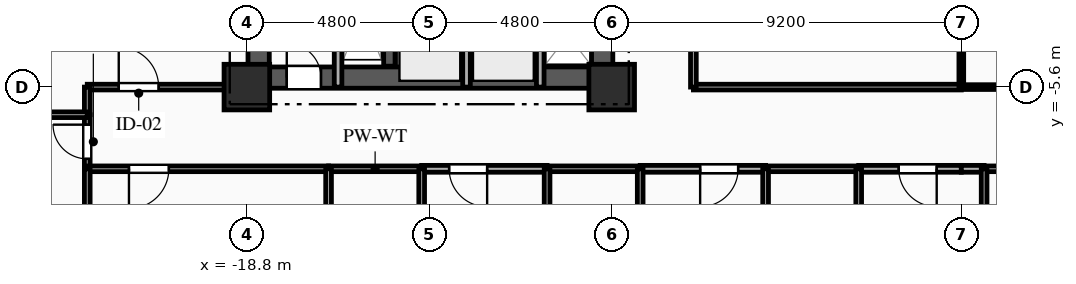
"""IFC4 building model, lengths in metres.
Left out: names, types, materials, properties, quantities, classifications, styles, units other than length and angle.
Written with IfcOpenShell. Run it as: python <this file> out.ifc"""

import sys

from ifc_helpers import new_model, si_unit, direction, frame, frame_2d, origin, origin_2d, place, context, subcontext, project, spatial, rectangle, extrude, element, fill, save


model = new_model("IFC4")
c1 = context("Model", 3, precision=1e-05, world=origin(), true_north=direction((0.0, 1.0)))
c2 = subcontext(c1, "Body", "Model", "MODEL_VIEW")
j1 = project(units=[si_unit("LENGTHUNIT", "METRE"), si_unit("PLANEANGLEUNIT", "RADIAN")], contexts=[c1])
p1 = place(None, origin())
s1 = spatial("IfcSite", under=j1, at=p1, CompositionType="ELEMENT")
p2 = place(p1, origin())
s2 = spatial("IfcBuilding", under=s1, at=p2, CompositionType="ELEMENT")
p3 = place(p2, frame((0.0, 0.0, 70.55)))
s3 = spatial("IfcBuildingStorey", under=s2, at=p3, CompositionType="ELEMENT", Elevation=70.55)
for number, where, z_axis, x_axis in (
    (1, (-18.8, -5.6, 0.0), (0.0, 0.0, 1.0), (1.0, 0.0, 0.0)),
    (2, (-9.2, -5.6, 0.0), (0.0, 0.0, 1.0), (1.0, 0.0, 0.0)),
):
    element("IfcColumn", number, at=place(p3, frame(where, z_axis=z_axis, x_axis=x_axis)), inside=s3, PredefinedType="COLUMN", context=c2, shape_type="SweptSolid", body=[
        extrude(rectangle(XDim=1.2, YDim=1.2, at=origin_2d()), origin(), (0.0, 0.0, 1.0), 3.35),
    ])
p4 = place(p3, frame((-18.8, -5.35, 0.0), z_axis=(0.0, 0.0, 1.0), x_axis=(1.0, 0.0, 0.0)))
e3 = element("IfcWall", 3, at=p4, inside=s3, PredefinedType="SHEAR", context=c2, shape_type="SweptSolid", body=[
    extrude(rectangle(XDim=9.6, YDim=0.56, at=frame_2d((4.8, 0.0))), origin(), (0.0, 0.0, 1.0), 3.0),
])
p5 = place(p4, frame((1.05, 0.0, 0.0)))
e4 = element("IfcOpeningElement", 4, at=p5, cuts=e3, PredefinedType="OPENING", context=c2, shape_type="SweptSolid", body=[
    extrude(rectangle(XDim=0.9, YDim=2.1, at=frame_2d((0.45, 1.05))), frame((0.0, 0.29, 0.0), z_axis=(0.0, -1.0, 0.0), x_axis=(1.0, 0.0, 0.0)), (0.0, 0.0, 1.0), 0.58),
])
p6 = place(p3, frame((-18.49, -5.05, 0.0), z_axis=(0.0, 0.0, 1.0), x_axis=(0.0, 1.0, 0.0)))
e5 = element("IfcWall", 5, at=p6, inside=s3, PredefinedType="SHEAR", context=c2, shape_type="SweptSolid", body=[
    extrude(rectangle(XDim=10.1, YDim=0.56, at=frame_2d((5.05, 0.0))), origin(), (0.0, 0.0, 1.0), 3.0),
])
p7 = place(p3, frame((-9.45, -5.05, 0.0), z_axis=(0.0, 0.0, 1.0), x_axis=(0.0, 1.0, 0.0)))
e6 = element("IfcWall", 6, at=p7, inside=s3, PredefinedType="SHEAR", context=c2, shape_type="SweptSolid", body=[
    extrude(rectangle(XDim=10.1, YDim=0.56, at=frame_2d((5.05, 0.0))), origin(), (0.0, 0.0, 1.0), 3.0),
])
p8 = place(p7, frame((7.15, 0.0, 0.0)))
e7 = element("IfcOpeningElement", 7, at=p8, cuts=e6, PredefinedType="OPENING", context=c2, shape_type="SweptSolid", body=[
    extrude(rectangle(XDim=0.9, YDim=2.1, at=frame_2d((0.45, 1.05))), frame((0.0, 0.29, 0.0), z_axis=(0.0, -1.0, 0.0), x_axis=(1.0, 0.0, 0.0)), (0.0, 0.0, 1.0), 0.58),
])
p9 = place(p7, frame((2.4, 0.0, 0.0)))
e8 = element("IfcOpeningElement", 8, at=p9, cuts=e6, PredefinedType="OPENING", context=c2, shape_type="SweptSolid", body=[
    extrude(rectangle(XDim=1.2, YDim=2.15, at=frame_2d((0.6, 1.075))), frame((0.0, 0.29, 0.0), z_axis=(0.0, -1.0, 0.0), x_axis=(1.0, 0.0, 0.0)), (0.0, 0.0, 1.0), 0.58),
])
p10 = place(p3, frame((-15.05, -5.05, 0.0), z_axis=(0.0, 0.0, 1.0), x_axis=(0.0, 1.0, 0.0)))
e9 = element("IfcWall", 9, at=p10, inside=s3, PredefinedType="SHEAR", context=c2, shape_type="SweptSolid", body=[
    extrude(rectangle(XDim=10.1, YDim=0.3, at=frame_2d((5.05, 0.0))), origin(), (0.0, 0.0, 1.0), 3.0),
])
p11 = place(p3, frame((-16.4, -5.6, 0.0), z_axis=(0.0, 0.0, 1.0), x_axis=(0.0, 1.0, 0.0)))
e10 = element("IfcWall", 10, at=p11, inside=s3, PredefinedType="PARTITIONING", context=c2, shape_type="SweptSolid", body=[
    extrude(rectangle(XDim=3.49, YDim=0.2, at=frame_2d((1.745, 0.0))), origin(), (0.0, 0.0, 1.0), 3.0),
])
for number, where, z_axis, x_axis in (
    (11, (-13.02, -5.6, 0.0), (0.0, 0.0, 1.0), (0.0, 1.0, 0.0)),
    (12, (-11.08, -5.6, 0.0), (0.0, 0.0, 1.0), (0.0, 1.0, 0.0)),
):
    element("IfcWall", number, at=place(p3, frame(where, z_axis=z_axis, x_axis=x_axis)), inside=s3, PredefinedType="PARTITIONING", context=c2, shape_type="SweptSolid", body=[
        extrude(rectangle(XDim=2.25, YDim=0.2, at=frame_2d((1.125, 0.0))), origin(), (0.0, 0.0, 1.0), 3.0),
    ])
p12 = place(p3, frame((-23.0, -7.75, 0.0), z_axis=(0.0, 0.0, 1.0), x_axis=(0.0, 1.0, 0.0)))
e13 = element("IfcWall", 13, at=p12, inside=s3, PredefinedType="PARTITIONING", context=c2, shape_type="SweptSolid", body=[
    extrude(rectangle(XDim=1.423, YDim=0.15, at=frame_2d((0.711, 0.0))), origin(), (0.0, 0.0, 1.0), 3.0),
])
p13 = place(p12, frame((0.261, 0.0, 0.0)))
e14 = element("IfcOpeningElement", 14, at=p13, cuts=e13, PredefinedType="OPENING", context=c2, shape_type="SweptSolid", body=[
    extrude(rectangle(XDim=0.9, YDim=2.1, at=frame_2d((0.45, 1.05))), frame((0.0, 0.085, 0.0), z_axis=(0.0, -1.0, 0.0), x_axis=(1.0, 0.0, 0.0)), (0.0, 0.0, 1.0), 0.17),
])
p14 = place(p3, frame((-23.0, -5.6, 0.0), z_axis=(0.0, 0.0, 1.0), x_axis=(1.0, 0.0, 0.0)))
e15 = element("IfcWall", 15, at=p14, inside=s3, PredefinedType="PARTITIONING", context=c2, shape_type="SweptSolid", body=[
    extrude(rectangle(XDim=4.2, YDim=0.15, at=frame_2d((2.1, 0.0))), origin(), (0.0, 0.0, 1.0), 3.0),
])
p15 = place(p14, frame((0.829, 0.0, 0.0)))
e16 = element("IfcOpeningElement", 16, at=p15, cuts=e15, PredefinedType="OPENING", context=c2, shape_type="SweptSolid", body=[
    extrude(rectangle(XDim=1.05, YDim=2.15, at=frame_2d((0.525, 1.075))), frame((0.0, 0.085, 0.0), z_axis=(0.0, -1.0, 0.0), x_axis=(1.0, 0.0, 0.0)), (0.0, 0.0, 1.0), 0.17),
])
p16 = place(p3, frame((-23.0, -6.327, 0.0), z_axis=(0.0, 0.0, 1.0), x_axis=(0.0, 1.0, 0.0)))
e17 = element("IfcWall", 17, at=p16, inside=s3, PredefinedType="PARTITIONING", context=c2, shape_type="SweptSolid", body=[
    extrude(rectangle(XDim=0.727, YDim=0.15, at=frame_2d((0.363, 0.0))), origin(), (0.0, 0.0, 1.0), 3.0),
])
p17 = place(p3, frame((-16.65, -7.75, 0.0), z_axis=(0.0, 0.0, 1.0), x_axis=(-1.0, 0.0, 0.0)))
e18 = element("IfcWall", 18, at=p17, inside=s3, PredefinedType="PARTITIONING", context=c2, shape_type="SweptSolid", body=[
    extrude(rectangle(XDim=6.35, YDim=0.15, at=frame_2d((3.175, 0.0))), origin(), (0.0, 0.0, 1.0), 3.0),
])
p18 = place(p17, frame((4.202, 0.0, 0.0)))
e19 = element("IfcOpeningElement", 19, at=p18, cuts=e18, PredefinedType="OPENING", context=c2, shape_type="SweptSolid", body=[
    extrude(rectangle(XDim=1.05, YDim=2.15, at=frame_2d((0.525, 1.075))), frame((0.0, 0.085, 0.0), z_axis=(0.0, -1.0, 0.0), x_axis=(1.0, 0.0, 0.0)), (0.0, 0.0, 1.0), 0.17),
])
p19 = place(p3, frame((-10.9, -7.75, 0.0), z_axis=(0.0, 0.0, 1.0), x_axis=(-1.0, 0.0, 0.0)))
e20 = element("IfcWall", 20, at=p19, inside=s3, PredefinedType="PARTITIONING", context=c2, shape_type="SweptSolid", body=[
    extrude(rectangle(XDim=3.3, YDim=0.18, at=frame_2d((1.65, 0.0))), origin(), (0.0, 0.0, 1.0), 3.0),
])
p20 = place(p19, frame((1.577, 0.0, 0.0)))
e21 = element("IfcOpeningElement", 21, at=p20, cuts=e20, PredefinedType="OPENING", context=c2, shape_type="SweptSolid", body=[
    extrude(rectangle(XDim=1.0, YDim=2.15, at=frame_2d((0.5, 1.075))), frame((0.0, 0.1, 0.0), z_axis=(0.0, -1.0, 0.0), x_axis=(1.0, 0.0, 0.0)), (0.0, 0.0, 1.0), 0.2),
])
p21 = place(p3, frame((-14.2, -7.75, 0.0), z_axis=(0.0, 0.0, 1.0), x_axis=(-1.0, 0.0, 0.0)))
e22 = element("IfcWall", 22, at=p21, inside=s3, PredefinedType="PLUMBINGWALL", context=c2, shape_type="SweptSolid", body=[
    extrude(rectangle(XDim=2.45, YDim=0.15, at=frame_2d((1.225, 0.0))), origin(), (0.0, 0.0, 1.0), 3.0),
])
p22 = place(p3, frame((-5.15, -7.75, 0.0), z_axis=(0.0, 0.0, 1.0), x_axis=(-1.0, 0.0, 0.0)))
e23 = element("IfcWall", 23, at=p22, inside=s3, PredefinedType="PARTITIONING", context=c2, shape_type="SweptSolid", body=[
    extrude(rectangle(XDim=3.3, YDim=0.18, at=frame_2d((1.65, 0.0))), origin(), (0.0, 0.0, 1.0), 3.0),
])
p23 = place(p22, frame((0.722, 0.0, 0.0)))
e24 = element("IfcOpeningElement", 24, at=p23, cuts=e23, PredefinedType="OPENING", context=c2, shape_type="SweptSolid", body=[
    extrude(rectangle(XDim=1.0, YDim=2.15, at=frame_2d((0.5, 1.075))), frame((0.0, 0.1, 0.0), z_axis=(0.0, -1.0, 0.0), x_axis=(1.0, 0.0, 0.0)), (0.0, 0.0, 1.0), 0.2),
])
p24 = place(p3, frame((-8.45, -7.75, 0.0), z_axis=(0.0, 0.0, 1.0), x_axis=(-1.0, 0.0, 0.0)))
e25 = element("IfcWall", 25, at=p24, inside=s3, PredefinedType="PLUMBINGWALL", context=c2, shape_type="SweptSolid", body=[
    extrude(rectangle(XDim=2.45, YDim=0.15, at=frame_2d((1.225, 0.0))), origin(), (0.0, 0.0, 1.0), 3.0),
])
p25 = place(p3, frame((0.0, -7.75, 0.0), z_axis=(0.0, 0.0, 1.0), x_axis=(-1.0, 0.0, 0.0)))
e26 = element("IfcWall", 26, at=p25, inside=s3, PredefinedType="PARTITIONING", context=c2, shape_type="SweptSolid", body=[
    extrude(rectangle(XDim=2.7, YDim=0.18, at=frame_2d((1.35, 0.0))), origin(), (0.0, 0.0, 1.0), 3.0),
])
p26 = place(p25, frame((0.647, 0.0, 0.0)))
e27 = element("IfcOpeningElement", 27, at=p26, cuts=e26, PredefinedType="OPENING", context=c2, shape_type="SweptSolid", body=[
    extrude(rectangle(XDim=1.0, YDim=2.15, at=frame_2d((0.5, 1.075))), frame((0.0, 0.1, 0.0), z_axis=(0.0, -1.0, 0.0), x_axis=(1.0, 0.0, 0.0)), (0.0, 0.0, 1.0), 0.2),
])
p27 = place(p3, frame((-2.7, -7.75, 0.0), z_axis=(0.0, 0.0, 1.0), x_axis=(-1.0, 0.0, 0.0)))
e28 = element("IfcWall", 28, at=p27, inside=s3, PredefinedType="PLUMBINGWALL", context=c2, shape_type="SweptSolid", body=[
    extrude(rectangle(XDim=2.45, YDim=0.15, at=frame_2d((1.225, 0.0))), origin(), (0.0, 0.0, 1.0), 3.0),
])
p28 = place(p3, frame((-7.05, -5.6, 0.0), z_axis=(0.0, 0.0, 1.0), x_axis=(1.0, 0.0, 0.0)))
e29 = element("IfcWall", 29, at=p28, inside=s3, PredefinedType="PARTITIONING", context=c2, shape_type="SweptSolid", body=[
    extrude(rectangle(XDim=7.05, YDim=0.15, at=frame_2d((3.525, 0.0))), origin(), (0.0, 0.0, 1.0), 2.485),
])
p29 = place(p3, frame((0.6, -7.75, 0.0), z_axis=(0.0, 0.0, 1.0), x_axis=(-1.0, 0.0, 0.0)))
e30 = element("IfcWall", 30, at=p29, inside=s3, PredefinedType="PARTITIONING", context=c2, shape_type="SweptSolid", body=[
    extrude(rectangle(XDim=0.6, YDim=0.18, at=frame_2d((0.3, 0.0))), origin(), (0.0, 0.0, 1.0), 3.0),
])
p30 = place(p3, frame((3.05, -7.75, 0.0), z_axis=(0.0, 0.0, 1.0), x_axis=(-1.0, 0.0, 0.0)))
e31 = element("IfcWall", 31, at=p30, inside=s3, PredefinedType="PLUMBINGWALL", context=c2, shape_type="SweptSolid", body=[
    extrude(rectangle(XDim=2.45, YDim=0.15, at=frame_2d((1.225, 0.0))), origin(), (0.0, 0.0, 1.0), 3.0),
])
p31 = place(p3, frame((0.0, -5.6, 0.0), z_axis=(0.0, 0.0, 1.0), x_axis=(1.0, 0.0, 0.0)))
e32 = element("IfcWall", 32, at=p31, inside=s3, PredefinedType="PARTITIONING", context=c2, shape_type="SweptSolid", body=[
    extrude(rectangle(XDim=7.05, YDim=0.125, at=frame_2d((3.525, 0.0))), origin(), (0.0, 0.0, 1.0), 2.485),
])
p32 = place(p3, frame((-7.05, 8.5, 0.0), z_axis=(0.0, 0.0, 1.0), x_axis=(0.0, -1.0, 0.0)))
e33 = element("IfcWall", 33, at=p32, inside=s3, PredefinedType="PARTITIONING", context=c2, shape_type="SweptSolid", body=[
    extrude(rectangle(XDim=14.1, YDim=0.15, at=frame_2d((7.05, 0.0))), origin(), (0.0, 0.0, 1.0), 3.0),
])
p33 = place(p32, frame((8.074, 0.0, 0.0)))
e34 = element("IfcOpeningElement", 34, at=p33, cuts=e33, PredefinedType="OPENING", context=c2, shape_type="SweptSolid", body=[
    extrude(rectangle(XDim=0.95, YDim=2.1, at=frame_2d((0.475, 1.05))), frame((0.0, 0.085, 0.0), z_axis=(0.0, -1.0, 0.0), x_axis=(1.0, 0.0, 0.0)), (0.0, 0.0, 1.0), 0.17),
])
p34 = place(p3, frame((-25.59, -6.327, 0.0), z_axis=(0.0, 0.0, 1.0), x_axis=(1.0, 0.0, 0.0)))
e35 = element("IfcWall", 35, at=p34, inside=s3, PredefinedType="PARTITIONING", context=c2, shape_type="SweptSolid", body=[
    extrude(rectangle(XDim=2.59, YDim=0.15, at=frame_2d((1.295, 0.0))), origin(), (0.0, 0.0, 1.0), 3.0),
])
p35 = place(p3, frame((-23.0, -7.75, 0.0), z_axis=(0.0, 0.0, 1.0), x_axis=(0.0, -1.0, 0.0)))
e36 = element("IfcWall", 36, at=p35, inside=s3, PredefinedType="PARTITIONING", context=c2, shape_type="SweptSolid", body=[
    extrude(rectangle(XDim=11.65, YDim=0.15, at=frame_2d((5.825, 0.0))), origin(), (0.0, 0.0, 1.0), 3.0),
])
for number, where, z_axis, x_axis in (
    (37, (-16.65, -7.75, 0.0), (0.0, 0.0, 1.0), (0.0, -1.0, 0.0)),
    (38, (-14.2, -9.9, 0.0), (0.0, 0.0, 1.0), (0.0, 1.0, 0.0)),
    (39, (-10.9, -7.75, 0.0), (0.0, 0.0, 1.0), (0.0, -1.0, 0.0)),
    (40, (-8.45, -9.9, 0.0), (0.0, 0.0, 1.0), (0.0, 1.0, 0.0)),
    (41, (-5.15, -7.75, 0.0), (0.0, 0.0, 1.0), (0.0, -1.0, 0.0)),
    (42, (-2.7, -9.9, 0.0), (0.0, 0.0, 1.0), (0.0, 1.0, 0.0)),
    (43, (0.6, -7.75, 0.0), (0.0, 0.0, 1.0), (0.0, -1.0, 0.0)),
):
    element("IfcWall", number, at=place(p3, frame(where, z_axis=z_axis, x_axis=x_axis)), inside=s3, PredefinedType="PLUMBINGWALL", context=c2, shape_type="SweptSolid", body=[
        extrude(rectangle(XDim=2.15, YDim=0.15, at=frame_2d((1.075, 0.0))), origin(), (0.0, 0.0, 1.0), 3.0),
    ])
p36 = place(p3, frame((0.0, 8.5, 0.0), z_axis=(0.0, 0.0, 1.0), x_axis=(0.0, -1.0, 0.0)))
e44 = element("IfcWall", 44, at=p36, inside=s3, PredefinedType="PARTITIONING", context=c2, shape_type="SweptSolid", body=[
    extrude(rectangle(XDim=14.1, YDim=0.125, at=frame_2d((7.05, 0.0))), origin(), (0.0, 0.0, 1.0), 3.0),
])
p37 = place(p5, origin())
e45 = element("IfcDoor", 45, at=p37, inside=s3, OperationType="SINGLE_SWING_LEFT", PredefinedType="DOOR", context=c2, shape_type="SweptSolid", body=[
    extrude(rectangle(XDim=0.9, YDim=2.1, at=frame_2d((0.45, 1.05))), frame((0.0, 0.025, 0.0), z_axis=(0.0, -1.0, 0.0), x_axis=(1.0, 0.0, 0.0)), (0.0, 0.0, 1.0), 0.05),
])
fill(e4, e45)
p38 = place(p13, origin())
e46 = element("IfcDoor", 46, at=p38, inside=s3, OperationType="SINGLE_SWING_RIGHT", PredefinedType="DOOR", context=c2, shape_type="SweptSolid", body=[
    extrude(rectangle(XDim=0.9, YDim=2.1, at=frame_2d((0.45, 1.05))), frame((0.0, 0.025, 0.0), z_axis=(0.0, -1.0, 0.0), x_axis=(1.0, 0.0, 0.0)), (0.0, 0.0, 1.0), 0.05),
])
fill(e14, e46)
p39 = place(p15, origin())
e47 = element("IfcDoor", 47, at=p39, inside=s3, OperationType="SINGLE_SWING_LEFT", PredefinedType="DOOR", context=c2, shape_type="SweptSolid", body=[
    extrude(rectangle(XDim=1.05, YDim=2.15, at=frame_2d((0.525, 1.075))), frame((0.0, 0.025, 0.0), z_axis=(0.0, -1.0, 0.0), x_axis=(1.0, 0.0, 0.0)), (0.0, 0.0, 1.0), 0.05),
])
fill(e16, e47)
p40 = place(p18, origin())
e48 = element("IfcDoor", 48, at=p40, inside=s3, OperationType="SINGLE_SWING_RIGHT", PredefinedType="DOOR", context=c2, shape_type="SweptSolid", body=[
    extrude(rectangle(XDim=1.05, YDim=2.15, at=frame_2d((0.525, 1.075))), frame((0.0, 0.025, 0.0), z_axis=(0.0, -1.0, 0.0), x_axis=(1.0, 0.0, 0.0)), (0.0, 0.0, 1.0), 0.05),
])
fill(e19, e48)
p41 = place(p20, origin())
e49 = element("IfcDoor", 49, at=p41, inside=s3, OperationType="SINGLE_SWING_LEFT", PredefinedType="DOOR", context=c2, shape_type="SweptSolid", body=[
    extrude(rectangle(XDim=1.0, YDim=2.15, at=frame_2d((0.5, 1.075))), frame((0.0, 0.025, 0.0), z_axis=(0.0, -1.0, 0.0), x_axis=(1.0, 0.0, 0.0)), (0.0, 0.0, 1.0), 0.05),
])
fill(e21, e49)
p42 = place(p23, origin())
e50 = element("IfcDoor", 50, at=p42, inside=s3, OperationType="SINGLE_SWING_RIGHT", PredefinedType="DOOR", context=c2, shape_type="SweptSolid", body=[
    extrude(rectangle(XDim=1.0, YDim=2.15, at=frame_2d((0.5, 1.075))), frame((0.0, 0.025, 0.0), z_axis=(0.0, -1.0, 0.0), x_axis=(1.0, 0.0, 0.0)), (0.0, 0.0, 1.0), 0.05),
])
fill(e24, e50)
p43 = place(p26, origin())
e51 = element("IfcDoor", 51, at=p43, inside=s3, OperationType="SINGLE_SWING_LEFT", PredefinedType="DOOR", context=c2, shape_type="SweptSolid", body=[
    extrude(rectangle(XDim=1.0, YDim=2.15, at=frame_2d((0.5, 1.075))), frame((0.0, 0.025, 0.0), z_axis=(0.0, -1.0, 0.0), x_axis=(1.0, 0.0, 0.0)), (0.0, 0.0, 1.0), 0.05),
])
fill(e27, e51)
save(model, sys.argv[1])
